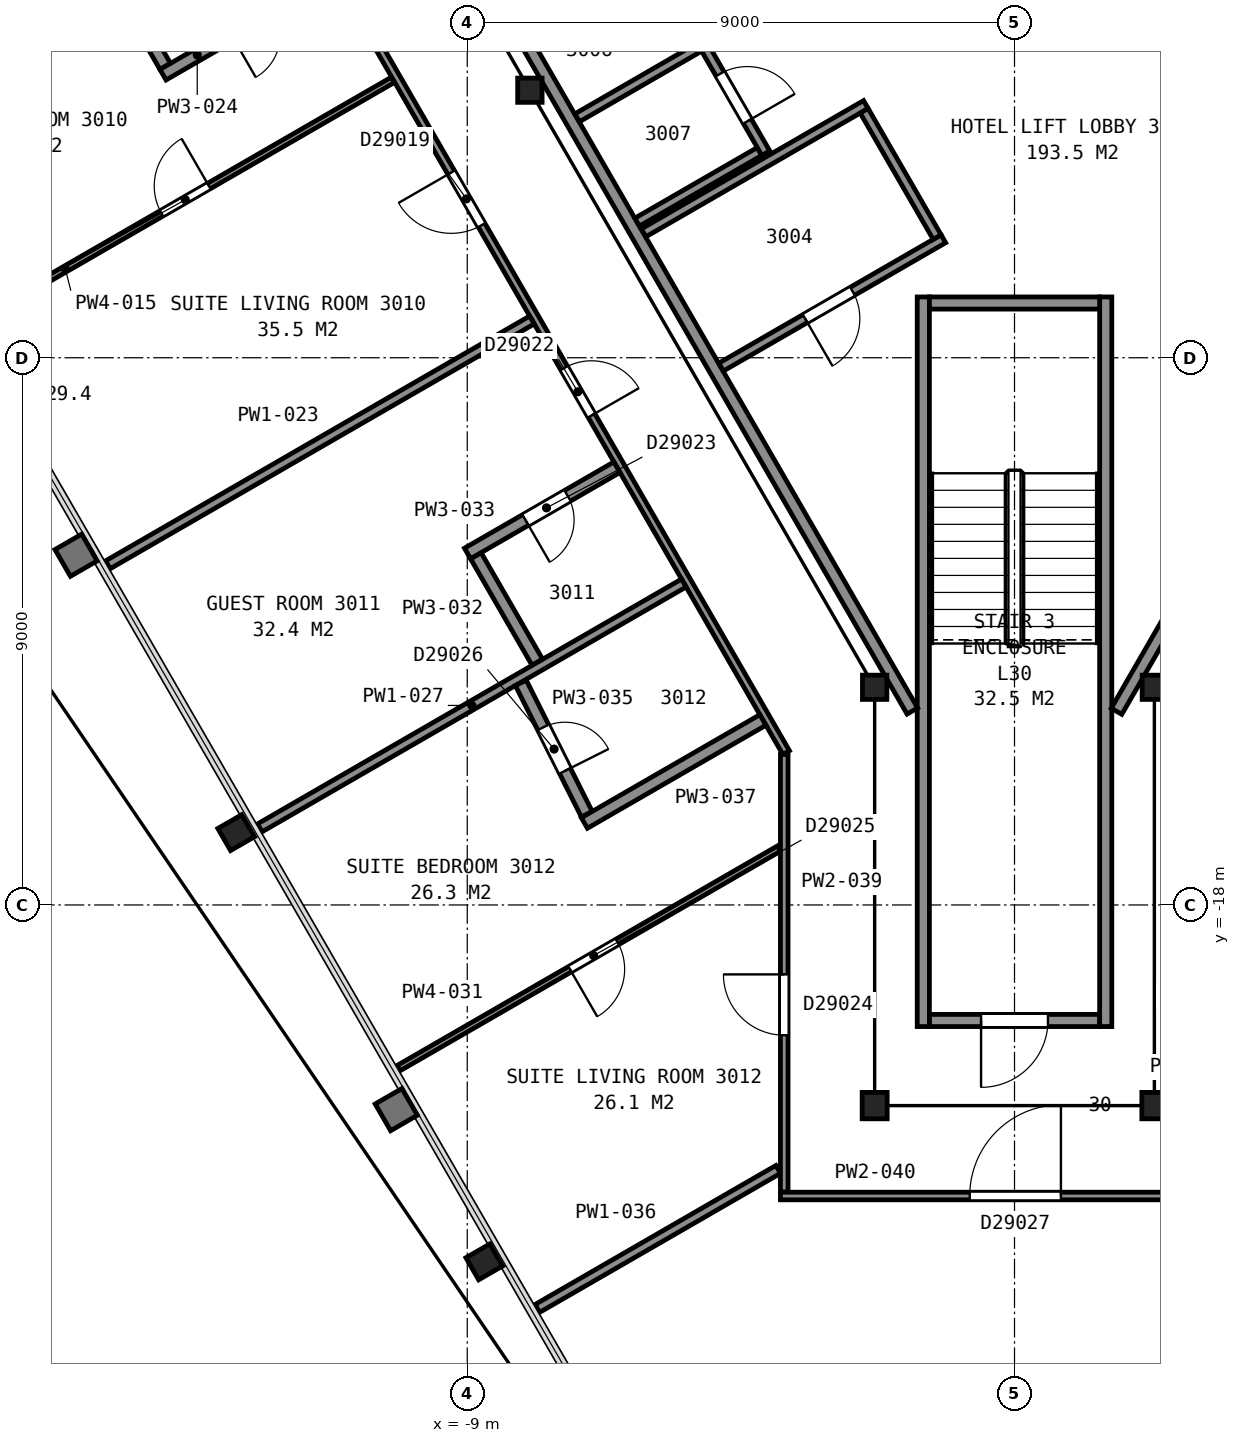
"""IFC4 building model, lengths in metres.
Left out: names, types, materials, properties, quantities, classifications, styles, units other than length and angle.
Written with IfcOpenShell. Run it as: python <this file> out.ifc"""

import sys

from ifc_helpers import new_model, si_unit, direction, frame, frame_2d, origin, origin_2d, place, context, subcontext, project, spatial, rectangle, i_section, extrude, element, fill, save


model = new_model("IFC4")
c1 = context("Model", 3, precision=1e-05, world=origin(), true_north=direction((0.0, 1.0)))
c2 = subcontext(c1, "Body", "Model", "MODEL_VIEW")
j1 = project(units=[si_unit("LENGTHUNIT", "METRE"), si_unit("PLANEANGLEUNIT", "RADIAN")], contexts=[c1])
p1 = place(None, origin())
s1 = spatial("IfcSite", under=j1, at=p1, CompositionType="ELEMENT")
p2 = place(p1, origin())
s2 = spatial("IfcBuilding", under=s1, at=p2, CompositionType="ELEMENT")
p3 = place(p2, frame((0.0, 0.0, 125.2)))
s3 = spatial("IfcBuildingStorey", under=s2, at=p3, CompositionType="ELEMENT", Elevation=125.2)
for number, where, z_axis, x_axis in (
    (1, (-12.8, -16.81, 0.0), (0.0, 0.0, 1.0), (-0.5, 0.866, 0.0)),
    (2, (-8.72, -23.87, 0.0), (0.0, 0.0, 1.0), (-0.5, 0.866, 0.0)),
):
    element("IfcColumn", number, at=place(p3, frame(where, z_axis=z_axis, x_axis=x_axis)), inside=s3, PredefinedType="COLUMN", context=c2, shape_type="SweptSolid", body=[
        extrude(i_section(OverallWidth=0.419, OverallDepth=0.455, WebThickness=0.042, FlangeThickness=0.068, FilletRadius=0.015, at=origin_2d()), origin(), (0.0, 0.0, 1.0), 3.56),
    ])
for number, where, z_axis, x_axis in (
    (3, (-7.97, -4.6, 0.0), (0.0, 0.0, 1.0), (1.0, 0.0, 0.0)),
    (4, (-2.3, -14.42, 0.0), (0.0, 0.0, 1.0), (1.0, 0.0, 0.0)),
):
    element("IfcColumn", number, at=place(p3, frame(where, z_axis=z_axis, x_axis=x_axis)), inside=s3, PredefinedType="COLUMN", context=c2, shape_type="SweptSolid", body=[
        extrude(i_section(OverallWidth=0.401, OverallDepth=0.399, WebThickness=0.025, FlangeThickness=0.04, FilletRadius=0.015, at=origin_2d()), origin(), (0.0, 0.0, 1.0), 3.6),
    ])
for number, where, z_axis, x_axis in (
    (5, (-2.3, -21.3, 0.0), (0.0, 0.0, 1.0), (-1.0, 0.0, 0.0)),
    (6, (2.3, -21.3, 0.0), (0.0, 0.0, 1.0), (-1.0, 0.0, 0.0)),
):
    element("IfcColumn", number, at=place(p3, frame(where, z_axis=z_axis, x_axis=x_axis)), inside=s3, PredefinedType="COLUMN", context=c2, shape_type="SweptSolid", body=[
        extrude(i_section(OverallWidth=0.411, OverallDepth=0.434, WebThickness=0.036, FlangeThickness=0.057, FilletRadius=0.015, at=origin_2d()), origin(), (0.0, 0.0, 1.0), 3.6),
    ])
p4 = place(p3, frame((2.3, -14.42, 0.0), z_axis=(0.0, 0.0, 1.0), x_axis=(1.0, 0.0, 0.0)))
e7 = element("IfcColumn", 7, at=p4, inside=s3, PredefinedType="COLUMN", context=c2, shape_type="SweptSolid", body=[
    extrude(i_section(OverallWidth=0.401, OverallDepth=0.399, WebThickness=0.025, FlangeThickness=0.04, FilletRadius=0.015, at=origin_2d()), origin(), (0.0, 0.0, 1.0), 3.6),
])
p5 = place(p3, frame((-1.4, -19.9, 0.0), z_axis=(0.0, 0.0, 1.0), x_axis=(1.0, 0.0, 0.0)))
e8 = element("IfcWall", 8, at=p5, inside=s3, PredefinedType="PARTITIONING", context=c2, shape_type="SweptSolid", body=[
    extrude(rectangle(XDim=2.8, YDim=0.2, at=frame_2d((1.4, 0.0))), origin(), (0.0, 0.0, 1.0), 3.35),
])
p6 = place(p5, frame((0.85, 0.0, 0.0)))
e9 = element("IfcOpeningElement", 9, at=p6, cuts=e8, PredefinedType="OPENING", context=c2, shape_type="SweptSolid", body=[
    extrude(rectangle(XDim=1.1, YDim=2.1, at=frame_2d((0.55, 1.05))), frame((0.0, 0.11, 0.0), z_axis=(0.0, -1.0, 0.0), x_axis=(1.0, 0.0, 0.0)), (0.0, 0.0, 1.0), 0.22),
])
for number, where, z_axis, x_axis in (
    (10, (1.5, -8.0, 0.0), (0.0, 0.0, 1.0), (0.0, -1.0, 0.0)),
    (11, (-1.5, -8.0, 0.0), (0.0, 0.0, 1.0), (0.0, -1.0, 0.0)),
):
    element("IfcWall", number, at=place(p3, frame(where, z_axis=z_axis, x_axis=x_axis)), inside=s3, PredefinedType="PARTITIONING", context=c2, shape_type="SweptSolid", body=[
        extrude(rectangle(XDim=12.0, YDim=0.2, at=frame_2d((6.0, 0.0))), origin(), (0.0, 0.0, 1.0), 3.35),
    ])
p7 = place(p3, frame((-1.4, -8.1, 0.0), z_axis=(0.0, 0.0, 1.0), x_axis=(1.0, 0.0, 0.0)))
e12 = element("IfcWall", 12, at=p7, inside=s3, PredefinedType="PARTITIONING", context=c2, shape_type="SweptSolid", body=[
    extrude(rectangle(XDim=2.8, YDim=0.2, at=frame_2d((1.4, 0.0))), origin(), (0.0, 0.0, 1.0), 3.35),
])
p8 = place(p3, frame((-13.664, 5.946, 0.0), z_axis=(0.0, 0.0, 1.0), x_axis=(0.499994327219, -0.866028678941, 0.0)))
e13 = element("IfcWall", 13, at=p8, inside=s3, PredefinedType="PARTITIONING", context=c2, shape_type="SweptSolid", body=[
    extrude(rectangle(XDim=23.968, YDim=0.2, at=frame_2d((11.984, 0.0))), origin(), (0.0, 0.0, 1.0), 3.35),
])
p9 = place(p3, frame((-7.192, -5.053, 0.0), z_axis=(0.0, 0.0, 1.0), x_axis=(0.865851878631, 0.500300434011, 0.0)))
e14 = element("IfcWall", 14, at=p9, inside=s3, PredefinedType="PARTITIONING", context=c2, shape_type="SweptSolid", body=[
    extrude(rectangle(XDim=2.315, YDim=0.15, at=frame_2d((1.158, 0.0))), origin(), (0.0, 0.0, 1.0), 3.35),
])
p10 = place(p3, frame((-6.206, -6.77, 0.0), z_axis=(0.0, 0.0, 1.0), x_axis=(0.865998469481, 0.500046648681, 0.0)))
e15 = element("IfcWall", 15, at=p10, inside=s3, PredefinedType="PARTITIONING", context=c2, shape_type="SweptSolid", body=[
    extrude(rectangle(XDim=2.325, YDim=0.15, at=frame_2d((1.163, 0.0))), origin(), (0.0, 0.0, 1.0), 3.35),
])
p11 = place(p3, frame((-6.1, -6.946, 0.0), z_axis=(0.0, 0.0, 1.0), x_axis=(0.866038200431, 0.499977834903, 0.0)))
e16 = element("IfcWall", 16, at=p11, inside=s3, PredefinedType="PARTITIONING", context=c2, shape_type="SweptSolid", body=[
    extrude(rectangle(XDim=4.22, YDim=0.15, at=frame_2d((2.11, 0.0))), origin(), (0.0, 0.0, 1.0), 3.35),
])
p12 = place(p3, frame((-4.091, -5.635, 0.0), z_axis=(0.0, 0.0, 1.0), x_axis=(-0.499948934428, 0.866054884499, 0.0)))
e17 = element("IfcWall", 17, at=p12, inside=s3, PredefinedType="PARTITIONING", context=c2, shape_type="SweptSolid", body=[
    extrude(rectangle(XDim=3.577, YDim=0.15, at=frame_2d((1.789, 0.0))), origin(), (0.0, 0.0, 1.0), 3.35),
])
p13 = place(p12, frame((2.377, 0.0, 0.0)))
e18 = element("IfcOpeningElement", 18, at=p13, cuts=e17, PredefinedType="OPENING", context=c2, shape_type="SweptSolid", body=[
    extrude(rectangle(XDim=0.9, YDim=2.1, at=frame_2d((0.45, 1.05))), frame((0.0, 0.085, 0.0), z_axis=(0.0, -1.0, 0.0), x_axis=(1.0, 0.0, 0.0)), (0.0, 0.0, 1.0), 0.17),
])
p14 = place(p12, frame((0.605, 0.0, 0.0)))
e19 = element("IfcOpeningElement", 19, at=p14, cuts=e17, PredefinedType="OPENING", context=c2, shape_type="SweptSolid", body=[
    extrude(rectangle(XDim=0.9, YDim=2.1, at=frame_2d((0.45, 1.05))), frame((0.0, 0.085, 0.0), z_axis=(0.0, -1.0, 0.0), x_axis=(1.0, 0.0, 0.0)), (0.0, 0.0, 1.0), 0.17),
])
p15 = place(p3, frame((-4.825, -9.154, 0.0), z_axis=(0.0, 0.0, 1.0), x_axis=(0.866023738697, 0.500002884005, 0.0)))
e20 = element("IfcWall", 20, at=p15, inside=s3, PredefinedType="PARTITIONING", context=c2, shape_type="SweptSolid", body=[
    extrude(rectangle(XDim=4.22, YDim=0.15, at=frame_2d((2.11, 0.0))), origin(), (0.0, 0.0, 1.0), 3.35),
])
p16 = place(p15, frame((1.595, 0.0, 0.0)))
e21 = element("IfcOpeningElement", 21, at=p16, cuts=e20, PredefinedType="OPENING", context=c2, shape_type="SweptSolid", body=[
    extrude(rectangle(XDim=0.9, YDim=2.1, at=frame_2d((0.45, 1.05))), frame((0.0, 0.085, 0.0), z_axis=(0.0, -1.0, 0.0), x_axis=(1.0, 0.0, 0.0)), (0.0, 0.0, 1.0), 0.17),
])
p17 = place(p3, frame((-2.472, -4.938, 0.0), z_axis=(0.0, 0.0, 1.0), x_axis=(0.500045362686, -0.865999212041, 0.0)))
e22 = element("IfcWall", 22, at=p17, inside=s3, PredefinedType="PARTITIONING", context=c2, shape_type="SweptSolid", body=[
    extrude(rectangle(XDim=2.4, YDim=0.15, at=frame_2d((1.2, 0.0))), origin(), (0.0, 0.0, 1.0), 3.35),
])
p18 = place(p3, frame((1.677, -14.815, 0.0), z_axis=(0.0, 0.0, 1.0), x_axis=(0.49999445743, 0.866028603765, 0.0)))
e23 = element("IfcWall", 23, at=p18, inside=s3, PredefinedType="PARTITIONING", context=c2, shape_type="SweptSolid", body=[
    extrude(rectangle(XDim=5.905, YDim=0.2, at=frame_2d((2.952, 0.0))), origin(), (0.0, 0.0, 1.0), 3.35),
])
p19 = place(p18, frame((3.855, 0.0, 0.0)))
e24 = element("IfcOpeningElement", 24, at=p19, cuts=e23, PredefinedType="OPENING", context=c2, shape_type="SweptSolid", body=[
    extrude(rectangle(XDim=1.8, YDim=2.1, at=frame_2d((0.9, 1.05))), frame((0.0, 0.11, 0.0), z_axis=(0.0, -1.0, 0.0), x_axis=(1.0, 0.0, 0.0)), (0.0, 0.0, 1.0), 0.22),
])
p20 = place(p3, frame((-19.473, -4.501, 0.0), z_axis=(0.0, 0.0, 1.0), x_axis=(0.866005217449, 0.50003496213, 0.0)))
e25 = element("IfcWall", 25, at=p20, inside=s3, PredefinedType="PARTITIONING", context=c2, shape_type="SweptSolid", body=[
    extrude(rectangle(XDim=8.047, YDim=0.15, at=frame_2d((4.024, 0.0))), origin(), (0.0, 0.0, 1.0), 2.613),
])
p21 = place(p3, frame((-17.192, -8.453, 0.0), z_axis=(0.0, 0.0, 1.0), x_axis=(0.865999665789, 0.500044576866, 0.0)))
e26 = element("IfcWall", 26, at=p21, inside=s3, PredefinedType="PARTITIONING", context=c2, shape_type="SweptSolid", body=[
    extrude(rectangle(XDim=8.048, YDim=0.1, at=frame_2d((4.024, 0.0))), origin(), (0.0, 0.0, 1.0), 2.613),
])
p22 = place(p21, frame((3.654, 0.0, 0.0)))
e27 = element("IfcOpeningElement", 27, at=p22, cuts=e26, PredefinedType="OPENING", context=c2, shape_type="SweptSolid", body=[
    extrude(rectangle(XDim=0.9, YDim=2.1, at=frame_2d((0.45, 1.05))), frame((0.0, 0.06, 0.0), z_axis=(0.0, -1.0, 0.0), x_axis=(1.0, 0.0, 0.0)), (0.0, 0.0, 1.0), 0.12),
])
p23 = place(p3, frame((-3.756, -15.494, 0.0), z_axis=(0.0, 0.0, 1.0), x_axis=(-0.500027787016, 0.866009360349, 0.0)))
e28 = element("IfcWall", 28, at=p23, inside=s3, PredefinedType="PARTITIONING", context=c2, shape_type="SweptSolid", body=[
    extrude(rectangle(XDim=23.856, YDim=0.125, at=frame_2d((11.928, 0.0))), origin(), (0.0, 0.0, 1.0), 2.613),
])
p24 = place(p23, frame((10.016, 0.0, 0.0)))
e29 = element("IfcOpeningElement", 29, at=p24, cuts=e28, PredefinedType="OPENING", context=c2, shape_type="SweptSolid", body=[
    extrude(rectangle(XDim=1.0, YDim=2.1, at=frame_2d((0.5, 1.05))), frame((0.0, 0.073, 0.0), z_axis=(0.0, -1.0, 0.0), x_axis=(1.0, 0.0, 0.0)), (0.0, 0.0, 1.0), 0.145),
])
p25 = place(p23, frame((6.402, 0.0, 0.0)))
e30 = element("IfcOpeningElement", 30, at=p25, cuts=e28, PredefinedType="OPENING", context=c2, shape_type="SweptSolid", body=[
    extrude(rectangle(XDim=0.9, YDim=2.1, at=frame_2d((0.45, 1.05))), frame((0.0, 0.073, 0.0), z_axis=(0.0, -1.0, 0.0), x_axis=(1.0, 0.0, 0.0)), (0.0, 0.0, 1.0), 0.145),
])
p26 = place(p3, frame((-15.177, -2.113, 0.0), z_axis=(0.0, 0.0, 1.0), x_axis=(0.500196916118, -0.865911684357, 0.0)))
e31 = element("IfcWall", 31, at=p26, inside=s3, PredefinedType="PARTITIONING", context=c2, shape_type="SweptSolid", body=[
    extrude(rectangle(XDim=2.42, YDim=0.2, at=frame_2d((1.21, 0.0))), origin(), (0.0, 0.0, 1.0), 2.613),
])
p27 = place(p3, frame((-14.91, -12.405, 0.0), z_axis=(0.0, 0.0, 1.0), x_axis=(0.866044217767, 0.499967411811, 0.0)))
e32 = element("IfcWall", 32, at=p27, inside=s3, PredefinedType="PARTITIONING", context=c2, shape_type="SweptSolid", body=[
    extrude(rectangle(XDim=8.052, YDim=0.15, at=frame_2d((4.026, 0.0))), origin(), (0.0, 0.0, 1.0), 2.613),
])
p28 = place(p3, frame((-14.004, -4.345, 0.0), z_axis=(0.0, 0.0, 1.0), x_axis=(0.866016035791, 0.500016225489, 0.0)))
e33 = element("IfcWall", 33, at=p28, inside=s3, PredefinedType="PARTITIONING", context=c2, shape_type="SweptSolid", body=[
    extrude(rectangle(XDim=3.237, YDim=0.2, at=frame_2d((1.619, 0.0))), origin(), (0.0, 0.0, 1.0), 2.613),
])
p29 = place(p28, frame((1.3, 0.0, 0.0)))
e34 = element("IfcOpeningElement", 34, at=p29, cuts=e33, PredefinedType="OPENING", context=c2, shape_type="SweptSolid", body=[
    extrude(rectangle(XDim=0.8, YDim=2.1, at=frame_2d((0.4, 1.05))), frame((0.0, 0.11, 0.0), z_axis=(0.0, -1.0, 0.0), x_axis=(1.0, 0.0, 0.0)), (0.0, 0.0, 1.0), 0.22),
])
p30 = place(p3, frame((-12.412, -16.732, 0.0), z_axis=(0.0, 0.0, 1.0), x_axis=(0.865997251595, 0.500048757853, 0.0)))
e35 = element("IfcWall", 35, at=p30, inside=s3, PredefinedType="PARTITIONING", context=c2, shape_type="SweptSolid", body=[
    extrude(rectangle(XDim=8.052, YDim=0.15, at=frame_2d((4.026, 0.0))), origin(), (0.0, 0.0, 1.0), 2.613),
])
p31 = place(p3, frame((-10.13, -20.684, 0.0), z_axis=(0.0, 0.0, 1.0), x_axis=(0.866023480589, 0.500003331057, 0.0)))
e36 = element("IfcWall", 36, at=p31, inside=s3, PredefinedType="PARTITIONING", context=c2, shape_type="SweptSolid", body=[
    extrude(rectangle(XDim=7.223, YDim=0.1, at=frame_2d((3.612, 0.0))), origin(), (0.0, 0.0, 1.0), 2.613),
])
p32 = place(p31, frame((3.254, 0.0, 0.0)))
e37 = element("IfcOpeningElement", 37, at=p32, cuts=e36, PredefinedType="OPENING", context=c2, shape_type="SweptSolid", body=[
    extrude(rectangle(XDim=0.9, YDim=2.1, at=frame_2d((0.45, 1.05))), frame((0.0, 0.06, 0.0), z_axis=(0.0, -1.0, 0.0), x_axis=(1.0, 0.0, 0.0)), (0.0, 0.0, 1.0), 0.12),
])
p33 = place(p3, frame((-8.859, -12.256, 0.0), z_axis=(0.0, 0.0, 1.0), x_axis=(0.499868889286, -0.866101087359, 0.0)))
e38 = element("IfcWall", 38, at=p33, inside=s3, PredefinedType="PARTITIONING", context=c2, shape_type="SweptSolid", body=[
    extrude(rectangle(XDim=2.021, YDim=0.2, at=frame_2d((1.01, 0.0))), origin(), (0.0, 0.0, 1.0), 2.613),
])
p34 = place(p3, frame((-6.538, -10.8, 0.0), z_axis=(0.0, 0.0, 1.0), x_axis=(-0.866048046904, -0.499960778915, 0.0)))
e39 = element("IfcWall", 39, at=p34, inside=s3, PredefinedType="PARTITIONING", context=c2, shape_type="SweptSolid", body=[
    extrude(rectangle(XDim=2.838, YDim=0.2, at=frame_2d((1.419, 0.0))), origin(), (0.0, 0.0, 1.0), 2.613),
])
p35 = place(p34, frame((0.938, 0.0, 0.0)))
e40 = element("IfcOpeningElement", 40, at=p35, cuts=e39, PredefinedType="OPENING", context=c2, shape_type="SweptSolid", body=[
    extrude(rectangle(XDim=0.8, YDim=2.1, at=frame_2d((0.4, 1.05))), frame((0.0, 0.11, 0.0), z_axis=(0.0, -1.0, 0.0), x_axis=(1.0, 0.0, 0.0)), (0.0, 0.0, 1.0), 0.22),
])
p36 = place(p3, frame((-8.119, -14.347, 0.0), z_axis=(0.0, 0.0, 1.0), x_axis=(0.448586498331, -0.893739421484, 0.0)))
e41 = element("IfcWall", 41, at=p36, inside=s3, PredefinedType="PARTITIONING", context=c2, shape_type="SweptSolid", body=[
    extrude(rectangle(XDim=2.417, YDim=0.2, at=frame_2d((1.209, 0.0))), origin(), (0.0, 0.0, 1.0), 2.613),
])
p37 = place(p36, frame((0.819, 0.0, 0.0)))
e42 = element("IfcOpeningElement", 42, at=p37, cuts=e41, PredefinedType="OPENING", context=c2, shape_type="SweptSolid", body=[
    extrude(rectangle(XDim=0.8, YDim=2.1, at=frame_2d((0.4, 1.05))), frame((0.0, 0.11, 0.0), z_axis=(0.0, -1.0, 0.0), x_axis=(1.0, 0.0, 0.0)), (0.0, 0.0, 1.0), 0.22),
])
p38 = place(p3, frame((-7.848, -24.636, 0.0), z_axis=(0.0, 0.0, 1.0), x_axis=(0.866046917185, 0.499962735845, 0.0)))
e43 = element("IfcWall", 43, at=p38, inside=s3, PredefinedType="PARTITIONING", context=c2, shape_type="SweptSolid", body=[
    extrude(rectangle(XDim=4.573, YDim=0.15, at=frame_2d((2.287, 0.0))), origin(), (0.0, 0.0, 1.0), 2.613),
])
p39 = place(p3, frame((-7.073, -16.652, 0.0), z_axis=(0.0, 0.0, 1.0), x_axis=(0.866009256036, 0.500027967679, 0.0)))
e44 = element("IfcWall", 44, at=p39, inside=s3, PredefinedType="PARTITIONING", context=c2, shape_type="SweptSolid", body=[
    extrude(rectangle(XDim=3.389, YDim=0.2, at=frame_2d((1.695, 0.0))), origin(), (0.0, 0.0, 1.0), 2.613),
])
p40 = place(p3, frame((-3.787, -22.722, 0.0), z_axis=(0.0, 0.0, 1.0), x_axis=(0.0, 1.0, 0.0)))
e45 = element("IfcWall", 45, at=p40, inside=s3, PredefinedType="PARTITIONING", context=c2, shape_type="SweptSolid", body=[
    extrude(rectangle(XDim=7.197, YDim=0.125, at=frame_2d((3.599, 0.0))), origin(), (0.0, 0.0, 1.0), 2.613),
])
p41 = place(p40, frame((2.58, 0.0, 0.0)))
e46 = element("IfcOpeningElement", 46, at=p41, cuts=e45, PredefinedType="OPENING", context=c2, shape_type="SweptSolid", body=[
    extrude(rectangle(XDim=1.0, YDim=2.1, at=frame_2d((0.5, 1.05))), frame((0.0, 0.073, 0.0), z_axis=(0.0, -1.0, 0.0), x_axis=(1.0, 0.0, 0.0)), (0.0, 0.0, 1.0), 0.145),
])
p42 = place(p3, frame((3.85, -22.787, 0.0), z_axis=(0.0, 0.0, 1.0), x_axis=(-1.0, 0.0, 0.0)))
e47 = element("IfcWall", 47, at=p42, inside=s3, PredefinedType="PARTITIONING", context=c2, shape_type="SweptSolid", body=[
    extrude(rectangle(XDim=7.699, YDim=0.125, at=frame_2d((3.85, 0.0))), origin(), (0.0, 0.0, 1.0), 2.613),
])
p43 = place(p42, frame((3.086, 0.0, 0.0)))
e48 = element("IfcOpeningElement", 48, at=p43, cuts=e47, PredefinedType="OPENING", context=c2, shape_type="SweptSolid", body=[
    extrude(rectangle(XDim=1.5, YDim=2.1, at=frame_2d((0.75, 1.05))), frame((0.0, 0.073, 0.0), z_axis=(0.0, -1.0, 0.0), x_axis=(1.0, 0.0, 0.0)), (0.0, 0.0, 1.0), 0.145),
])
p44 = place(p6, origin())
e49 = element("IfcDoor", 49, at=p44, inside=s3, OperationType="SINGLE_SWING_LEFT", PredefinedType="DOOR", context=c2, shape_type="SweptSolid", body=[
    extrude(rectangle(XDim=1.1, YDim=2.1, at=frame_2d((0.55, 1.05))), frame((0.0, 0.025, 0.0), z_axis=(0.0, -1.0, 0.0), x_axis=(1.0, 0.0, 0.0)), (0.0, 0.0, 1.0), 0.05),
])
fill(e9, e49)
p45 = place(p14, origin())
e50 = element("IfcDoor", 50, at=p45, inside=s3, OperationType="SINGLE_SWING_LEFT", PredefinedType="DOOR", context=c2, shape_type="SweptSolid", body=[
    extrude(rectangle(XDim=0.9, YDim=2.1, at=frame_2d((0.45, 1.05))), frame((0.0, 0.025, 0.0), z_axis=(0.0, -1.0, 0.0), x_axis=(1.0, 0.0, 0.0)), (0.0, 0.0, 1.0), 0.05),
])
fill(e19, e50)
p46 = place(p16, origin())
e51 = element("IfcDoor", 51, at=p46, inside=s3, OperationType="SINGLE_SWING_LEFT", PredefinedType="DOOR", context=c2, shape_type="SweptSolid", body=[
    extrude(rectangle(XDim=0.9, YDim=2.1, at=frame_2d((0.45, 1.05))), frame((0.0, 0.025, 0.0), z_axis=(0.0, -1.0, 0.0), x_axis=(1.0, 0.0, 0.0)), (0.0, 0.0, 1.0), 0.05),
])
fill(e21, e51)
p47 = place(p22, origin())
e52 = element("IfcDoor", 52, at=p47, inside=s3, OperationType="SINGLE_SWING_RIGHT", PredefinedType="DOOR", context=c2, shape_type="SweptSolid", body=[
    extrude(rectangle(XDim=0.9, YDim=2.1, at=frame_2d((0.45, 1.05))), frame((0.0, 0.025, 0.0), z_axis=(0.0, -1.0, 0.0), x_axis=(1.0, 0.0, 0.0)), (0.0, 0.0, 1.0), 0.05),
])
fill(e27, e52)
p48 = place(p24, origin())
e53 = element("IfcDoor", 53, at=p48, inside=s3, OperationType="SINGLE_SWING_RIGHT", PredefinedType="DOOR", context=c2, shape_type="SweptSolid", body=[
    extrude(rectangle(XDim=1.0, YDim=2.1, at=frame_2d((0.5, 1.05))), frame((0.0, 0.025, 0.0), z_axis=(0.0, -1.0, 0.0), x_axis=(1.0, 0.0, 0.0)), (0.0, 0.0, 1.0), 0.05),
])
fill(e29, e53)
p49 = place(p25, origin())
e54 = element("IfcDoor", 54, at=p49, inside=s3, OperationType="SINGLE_SWING_LEFT", PredefinedType="DOOR", context=c2, shape_type="SweptSolid", body=[
    extrude(rectangle(XDim=0.9, YDim=2.1, at=frame_2d((0.45, 1.05))), frame((0.0, 0.025, 0.0), z_axis=(0.0, -1.0, 0.0), x_axis=(1.0, 0.0, 0.0)), (0.0, 0.0, 1.0), 0.05),
])
fill(e30, e54)
p50 = place(p32, origin())
e55 = element("IfcDoor", 55, at=p50, inside=s3, OperationType="SINGLE_SWING_LEFT", PredefinedType="DOOR", context=c2, shape_type="SweptSolid", body=[
    extrude(rectangle(XDim=0.9, YDim=2.1, at=frame_2d((0.45, 1.05))), frame((0.0, 0.025, 0.0), z_axis=(0.0, -1.0, 0.0), x_axis=(1.0, 0.0, 0.0)), (0.0, 0.0, 1.0), 0.05),
])
fill(e37, e55)
p51 = place(p35, origin())
e56 = element("IfcDoor", 56, at=p51, inside=s3, OperationType="SINGLE_SWING_RIGHT", PredefinedType="DOOR", context=c2, shape_type="SweptSolid", body=[
    extrude(rectangle(XDim=0.8, YDim=2.1, at=frame_2d((0.4, 1.05))), frame((0.0, 0.025, 0.0), z_axis=(0.0, -1.0, 0.0), x_axis=(1.0, 0.0, 0.0)), (0.0, 0.0, 1.0), 0.05),
])
fill(e40, e56)
p52 = place(p37, origin())
e57 = element("IfcDoor", 57, at=p52, inside=s3, OperationType="SINGLE_SWING_RIGHT", PredefinedType="DOOR", context=c2, shape_type="SweptSolid", body=[
    extrude(rectangle(XDim=0.8, YDim=2.1, at=frame_2d((0.4, 1.05))), frame((0.0, 0.025, 0.0), z_axis=(0.0, -1.0, 0.0), x_axis=(1.0, 0.0, 0.0)), (0.0, 0.0, 1.0), 0.05),
])
fill(e42, e57)
p53 = place(p41, origin())
e58 = element("IfcDoor", 58, at=p53, inside=s3, OperationType="SINGLE_SWING_RIGHT", PredefinedType="DOOR", context=c2, shape_type="SweptSolid", body=[
    extrude(rectangle(XDim=1.0, YDim=2.1, at=frame_2d((0.5, 1.05))), frame((0.0, 0.025, 0.0), z_axis=(0.0, -1.0, 0.0), x_axis=(1.0, 0.0, 0.0)), (0.0, 0.0, 1.0), 0.05),
])
fill(e46, e58)
p54 = place(p43, origin())
e59 = element("IfcDoor", 59, at=p54, inside=s3, OperationType="DOUBLE_DOOR_SINGLE_SWING", PredefinedType="DOOR", context=c2, shape_type="SweptSolid", body=[
    extrude(rectangle(XDim=1.5, YDim=2.1, at=frame_2d((0.75, 1.05))), frame((0.0, 0.025, 0.0), z_axis=(0.0, -1.0, 0.0), x_axis=(1.0, 0.0, 0.0)), (0.0, 0.0, 1.0), 0.05),
])
fill(e48, e59)
save(model, sys.argv[1])
